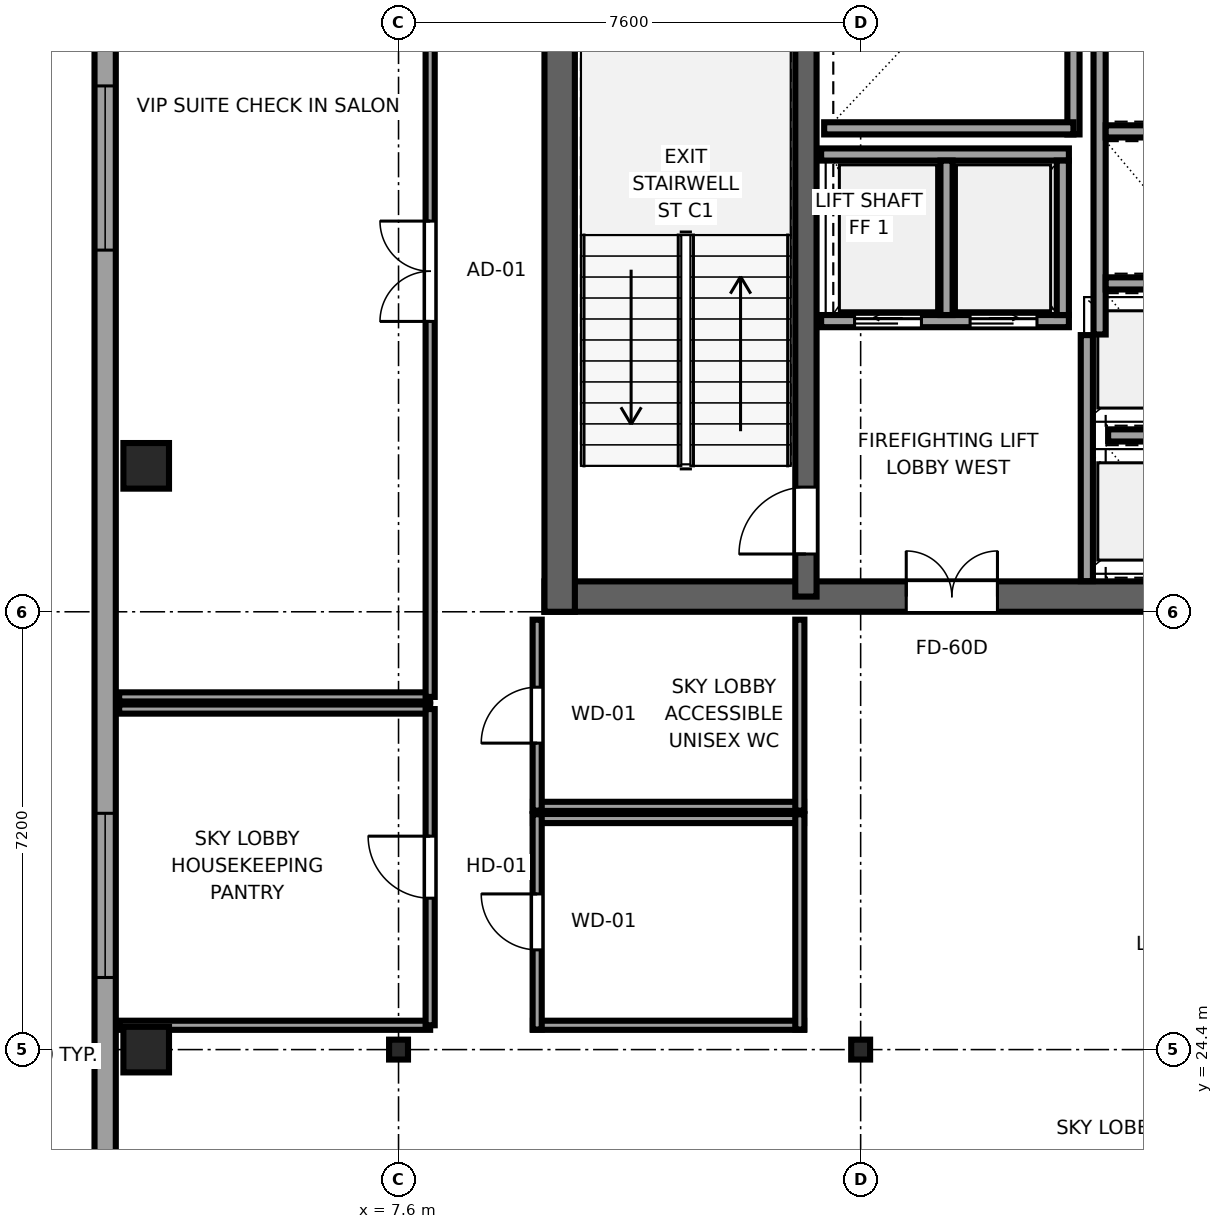
"""IFC4 building model, lengths in metres.
Left out: names, types, materials, properties, quantities, classifications, styles, units other than length and angle.
Written with IfcOpenShell. Run it as: python <this file> out.ifc"""

import sys

from ifc_helpers import new_model, si_unit, direction, frame, frame_2d, origin, origin_2d, place, context, subcontext, project, spatial, rectangle, i_section, extrude, source, transform, mapped, element, fill, save


model = new_model("IFC4")
c1 = context("Model", 3, precision=1e-05, world=origin(), true_north=direction((0.0, 1.0)))
c2 = subcontext(c1, "Body", "Model", "MODEL_VIEW")
j1 = project(units=[si_unit("LENGTHUNIT", "METRE"), si_unit("PLANEANGLEUNIT", "RADIAN")], contexts=[c1])
p1 = place(None, origin())
s1 = spatial("IfcSite", under=j1, at=p1, CompositionType="ELEMENT")
p2 = place(p1, origin())
s2 = spatial("IfcBuilding", under=s1, at=p2, CompositionType="ELEMENT")
p3 = place(p2, frame((0.0, 0.0, 205.3)))
s3 = spatial("IfcBuildingStorey", under=s2, at=p3, CompositionType="ELEMENT", Elevation=205.3)
p4 = place(p3, frame((10.0, 31.85, 0.0), z_axis=(0.0, 0.0, 1.0), x_axis=(1.0, 0.0, 0.0)))
e1 = element("IfcWall", 1, at=p4, inside=s3, PredefinedType="SHEAR", context=c2, shape_type="SweptSolid", body=[
    extrude(rectangle(XDim=26.0, YDim=0.5, at=frame_2d((13.0, 0.0))), origin(), (0.0, 0.0, 1.0), 4.4),
])
p5 = place(p4, frame((7.45, 0.0, 0.0), z_axis=(0.0, 0.0, 1.0), x_axis=(-1.0, 0.0, 0.0)))
e2 = element("IfcOpeningElement", 2, at=p5, cuts=e1, PredefinedType="OPENING", context=c2, shape_type="SweptSolid", body=[
    extrude(rectangle(XDim=1.5, YDim=2.04, at=frame_2d((0.75, 1.02))), frame((0.0, 0.26, 0.0), z_axis=(0.0, -1.0, 0.0), x_axis=(1.0, 0.0, 0.0)), (0.0, 0.0, 1.0), 0.52),
])
p6 = place(p4, frame((13.75, 0.0, 0.0), z_axis=(0.0, 0.0, 1.0), x_axis=(-1.0, 0.0, 0.0)))
e3 = element("IfcOpeningElement", 3, at=p6, cuts=e1, PredefinedType="OPENING", context=c2, shape_type="SweptSolid", body=[
    extrude(rectangle(XDim=1.5, YDim=2.04, at=frame_2d((0.75, 1.02))), frame((0.0, 0.26, 0.0), z_axis=(0.0, -1.0, 0.0), x_axis=(1.0, 0.0, 0.0)), (0.0, 0.0, 1.0), 0.52),
])
p7 = place(p4, frame((20.05, 0.0, 0.0), z_axis=(0.0, 0.0, 1.0), x_axis=(-1.0, 0.0, 0.0)))
e4 = element("IfcOpeningElement", 4, at=p7, cuts=e1, PredefinedType="OPENING", context=c2, shape_type="SweptSolid", body=[
    extrude(rectangle(XDim=1.5, YDim=2.04, at=frame_2d((0.75, 1.02))), frame((0.0, 0.26, 0.0), z_axis=(0.0, -1.0, 0.0), x_axis=(1.0, 0.0, 0.0)), (0.0, 0.0, 1.0), 0.52),
])
p8 = place(p3, frame((10.25, 31.6, 0.0), z_axis=(0.0, 0.0, 1.0), x_axis=(0.0, 1.0, 0.0)))
e5 = element("IfcWall", 5, at=p8, inside=s3, PredefinedType="SHEAR", context=c2, shape_type="SweptSolid", body=[
    extrude(rectangle(XDim=13.6, YDim=0.5, at=frame_2d((6.8, 0.0))), origin(), (0.0, 0.0, 1.0), 4.4),
])
p9 = place(p3, frame((14.3, 31.85, 0.0), z_axis=(0.0, 0.0, 1.0), x_axis=(0.0, 1.0, 0.0)))
e6 = element("IfcWall", 6, at=p9, inside=s3, PredefinedType="SHEAR", context=c2, shape_type="SweptSolid", body=[
    extrude(rectangle(XDim=13.1, YDim=0.35, at=frame_2d((6.55, 0.0))), origin(), (0.0, 0.0, 1.0), 4.4),
])
p10 = place(p9, frame((0.7, 0.0, 0.0)))
e7 = element("IfcOpeningElement", 7, at=p10, cuts=e6, PredefinedType="OPENING", context=c2, shape_type="SweptSolid", body=[
    extrude(rectangle(XDim=1.1, YDim=2.12, at=frame_2d((0.55, 1.06))), frame((0.0, 0.185, 0.0), z_axis=(0.0, -1.0, 0.0), x_axis=(1.0, 0.0, 0.0)), (0.0, 0.0, 1.0), 0.37),
])
m1 = source(origin(), c2, "Body", "SweptSolid", [
    extrude(rectangle(XDim=0.75, YDim=0.75, at=origin_2d()), origin(), (0.0, 0.0, 1.0), 4.4),
])
p11 = place(p3, frame((3.45, 24.4, 0.0), z_axis=(0.0, 0.0, 1.0), x_axis=(1.0, 0.0, 0.0)))
e8 = element("IfcColumn", 8, at=p11, inside=s3, PredefinedType="COLUMN", context=c2, shape_type="MappedRepresentation", body=[
    mapped(m1, transform((0.0, 0.0, 0.0), x_axis=(1.0, 0.0, 0.0), y_axis=(0.0, 1.0, 0.0), z_axis=(0.0, 0.0, 1.0), scale=1.0)),
])
m2 = source(origin(), c2, "Body", "SweptSolid", [
    extrude(i_section(OverallWidth=0.311, OverallDepth=0.327, WebThickness=0.016, FlangeThickness=0.025, FilletRadius=0.017, at=origin_2d()), origin(), (0.0, 0.0, 1.0), 4.4),
])
for number, where, z_axis, x_axis in (
    (9, (7.6, 24.4, 0.0), (0.0, 0.0, 1.0), (1.0, 0.0, 0.0)),
    (10, (15.2, 24.4, 0.0), (0.0, 0.0, 1.0), (1.0, 0.0, 0.0)),
):
    element("IfcColumn", number, at=place(p3, frame(where, z_axis=z_axis, x_axis=x_axis)), inside=s3, PredefinedType="COLUMN", context=c2, shape_type="MappedRepresentation", body=[
        mapped(m2, transform((0.0, 0.0, 0.0), x_axis=(1.0, 0.0, 0.0), y_axis=(0.0, 1.0, 0.0), z_axis=(0.0, 0.0, 1.0), scale=1.0)),
    ])
p12 = place(p3, frame((3.45, 34.0, 0.0), z_axis=(0.0, 0.0, 1.0), x_axis=(1.0, 0.0, 0.0)))
e11 = element("IfcColumn", 11, at=p12, inside=s3, PredefinedType="COLUMN", context=c2, shape_type="MappedRepresentation", body=[
    mapped(m1, transform((0.0, 0.0, 0.0), x_axis=(1.0, 0.0, 0.0), y_axis=(0.0, 1.0, 0.0), z_axis=(0.0, 0.0, 1.0), scale=1.0)),
])
p13 = place(p3, frame((2.775, 41.583, 0.0), z_axis=(0.0, 0.0, 1.0), x_axis=(0.0, -1.0, 0.0)))
e12 = element("IfcWall", 12, at=p13, inside=s3, PredefinedType="SOLIDWALL", context=c2, shape_type="SweptSolid", body=[
    extrude(rectangle(XDim=34.566, YDim=0.35, at=frame_2d((17.283, 0.0))), origin(), (0.0, 0.0, 1.0), 4.22),
])
p14 = place(p13, frame((1.335, 0.0, 0.68)))
e13 = element("IfcOpeningElement", 13, at=p14, cuts=e12, PredefinedType="OPENING", context=c2, shape_type="SweptSolid", body=[
    extrude(rectangle(XDim=2.7, YDim=1.95, at=frame_2d((1.35, 0.975))), frame((0.0, 0.185, 0.0), z_axis=(0.0, -1.0, 0.0), x_axis=(1.0, 0.0, 0.0)), (0.0, 0.0, 1.0), 0.37),
])
p15 = place(p13, frame((13.297, 0.0, 0.68)))
e14 = element("IfcOpeningElement", 14, at=p15, cuts=e12, PredefinedType="OPENING", context=c2, shape_type="SweptSolid", body=[
    extrude(rectangle(XDim=2.7, YDim=1.95, at=frame_2d((1.35, 0.975))), frame((0.0, 0.185, 0.0), z_axis=(0.0, -1.0, 0.0), x_axis=(1.0, 0.0, 0.0)), (0.0, 0.0, 1.0), 0.37),
])
p16 = place(p13, frame((22.189, 0.0, 0.68)))
e15 = element("IfcOpeningElement", 15, at=p16, cuts=e12, PredefinedType="OPENING", context=c2, shape_type="SweptSolid", body=[
    extrude(rectangle(XDim=2.7, YDim=1.95, at=frame_2d((1.35, 0.975))), frame((0.0, 0.185, 0.0), z_axis=(0.0, -1.0, 0.0), x_axis=(1.0, 0.0, 0.0)), (0.0, 0.0, 1.0), 0.37),
])
p17 = place(p13, frame((26.36, 0.0, 0.68)))
e16 = element("IfcOpeningElement", 16, at=p17, cuts=e12, PredefinedType="OPENING", context=c2, shape_type="SweptSolid", body=[
    extrude(rectangle(XDim=2.7, YDim=1.95, at=frame_2d((1.35, 0.975))), frame((0.0, 0.185, 0.0), z_axis=(0.0, -1.0, 0.0), x_axis=(1.0, 0.0, 0.0)), (0.0, 0.0, 1.0), 0.37),
])
p18 = place(p13, frame((29.98, 0.0, 0.68)))
e17 = element("IfcOpeningElement", 17, at=p18, cuts=e12, PredefinedType="OPENING", context=c2, shape_type="SweptSolid", body=[
    extrude(rectangle(XDim=2.7, YDim=1.95, at=frame_2d((1.35, 0.975))), frame((0.0, 0.185, 0.0), z_axis=(0.0, -1.0, 0.0), x_axis=(1.0, 0.0, 0.0)), (0.0, 0.0, 1.0), 0.37),
])
p19 = place(p3, frame((18.7, 39.45, 0.0), z_axis=(0.0, 0.0, 1.0), x_axis=(0.0, 1.0, 0.0)))
e18 = element("IfcWall", 18, at=p19, inside=s3, PredefinedType="SOLIDWALL", context=c2, shape_type="SweptSolid", body=[
    extrude(rectangle(XDim=4.4, YDim=0.2, at=frame_2d((2.2, 0.0))), origin(), (0.0, 0.0, 1.0), 4.22),
])
p20 = place(p3, frame((14.6, 39.55, 0.0), z_axis=(0.0, 0.0, 1.0), x_axis=(1.0, 0.0, 0.0)))
e19 = element("IfcWall", 19, at=p20, inside=s3, PredefinedType="SOLIDWALL", context=c2, shape_type="SweptSolid", body=[
    extrude(rectangle(XDim=4.1, YDim=0.2, at=frame_2d((2.05, 0.0))), origin(), (0.0, 0.0, 1.0), 4.22),
])
p21 = place(p3, frame((18.92, 32.104, 0.0), z_axis=(0.0, 0.0, 1.0), x_axis=(0.0, 1.0, 0.0)))
e20 = element("IfcWall", 20, at=p21, inside=s3, PredefinedType="SOLIDWALL", context=c2, shape_type="SweptSolid", body=[
    extrude(rectangle(XDim=4.046, YDim=0.2, at=frame_2d((2.023, 0.0))), origin(), (0.0, 0.0, 1.0), 4.22),
])
p22 = place(p3, frame((19.13, 36.16, 0.0), z_axis=(0.0, 0.0, 1.0), x_axis=(0.0, 1.0, 0.0)))
e21 = element("IfcWall", 21, at=p22, inside=s3, PredefinedType="SOLIDWALL", context=c2, shape_type="SweptSolid", body=[
    extrude(rectangle(XDim=8.38, YDim=0.2, at=frame_2d((4.19, 0.0))), origin(), (0.0, 0.0, 1.0), 4.22),
])
p23 = place(p3, frame((19.27, 34.5, 0.0), z_axis=(0.0, 0.0, 1.0), x_axis=(1.0, 0.0, 0.0)))
e22 = element("IfcWall", 22, at=p23, inside=s3, PredefinedType="SOLIDWALL", context=c2, shape_type="SweptSolid", body=[
    extrude(rectangle(XDim=1.8, YDim=0.2, at=frame_2d((0.9, 0.0))), origin(), (0.0, 0.0, 1.0), 4.22),
])
for number, where, z_axis, x_axis in (
    (23, (19.23, 37.0, 0.0), (0.0, 0.0, 1.0), (1.0, 0.0, 0.0)),
    (24, (19.23, 39.5, 0.0), (0.0, 0.0, 1.0), (1.0, 0.0, 0.0)),
):
    element("IfcWall", number, at=place(p3, frame(where, z_axis=z_axis, x_axis=x_axis)), inside=s3, PredefinedType="SOLIDWALL", context=c2, shape_type="SweptSolid", body=[
        extrude(rectangle(XDim=1.84, YDim=0.2, at=frame_2d((0.92, 0.0))), origin(), (0.0, 0.0, 1.0), 4.22),
    ])
p24 = place(p3, frame((14.55, 36.38, 0.0), z_axis=(0.0, 0.0, 1.0), x_axis=(1.0, 0.0, 0.0)))
e25 = element("IfcWall", 25, at=p24, inside=s3, PredefinedType="SOLIDWALL", context=c2, shape_type="SweptSolid", body=[
    extrude(rectangle(XDim=4.075, YDim=0.2, at=frame_2d((2.038, 0.0))), origin(), (0.0, 0.0, 1.0), 4.22),
])
p25 = place(p24, frame((0.55, 0.0, 0.0)))
e26 = element("IfcOpeningElement", 26, at=p25, cuts=e25, PredefinedType="OPENING", context=c2, shape_type="SweptSolid", body=[
    extrude(rectangle(XDim=1.1, YDim=2.12, at=frame_2d((0.55, 1.06))), frame((0.0, 0.11, 0.0), z_axis=(0.0, -1.0, 0.0), x_axis=(1.0, 0.0, 0.0)), (0.0, 0.0, 1.0), 0.22),
])
p26 = place(p24, frame((2.45, 0.0, 0.0)))
e27 = element("IfcOpeningElement", 27, at=p26, cuts=e25, PredefinedType="OPENING", context=c2, shape_type="SweptSolid", body=[
    extrude(rectangle(XDim=1.1, YDim=2.12, at=frame_2d((0.55, 1.06))), frame((0.0, 0.11, 0.0), z_axis=(0.0, -1.0, 0.0), x_axis=(1.0, 0.0, 0.0)), (0.0, 0.0, 1.0), 0.22),
])
p27 = place(p3, frame((14.55, 39.12, 0.0), z_axis=(0.0, 0.0, 1.0), x_axis=(1.0, 0.0, 0.0)))
e28 = element("IfcWall", 28, at=p27, inside=s3, PredefinedType="SOLIDWALL", context=c2, shape_type="SweptSolid", body=[
    extrude(rectangle(XDim=4.075, YDim=0.2, at=frame_2d((2.038, 0.0))), origin(), (0.0, 0.0, 1.0), 4.22),
])
for number, where, z_axis, x_axis in (
    (29, (18.525, 36.48, 0.0), (0.0, 0.0, 1.0), (0.0, 1.0, 0.0)),
    (30, (16.613, 36.48, 0.0), (0.0, 0.0, 1.0), (0.0, 1.0, 0.0)),
):
    element("IfcWall", number, at=place(p3, frame(where, z_axis=z_axis, x_axis=x_axis)), inside=s3, PredefinedType="SOLIDWALL", context=c2, shape_type="SweptSolid", body=[
        extrude(rectangle(XDim=2.54, YDim=0.2, at=frame_2d((1.27, 0.0))), origin(), (0.0, 0.0, 1.0), 4.22),
    ])
p28 = place(p3, frame((3.005, 30.2, 0.0), z_axis=(0.0, 0.0, 1.0), x_axis=(1.0, 0.0, 0.0)))
e31 = element("IfcWall", 31, at=p28, inside=s3, PredefinedType="PARTITIONING", context=c2, shape_type="SweptSolid", body=[
    extrude(rectangle(XDim=5.115, YDim=0.15, at=frame_2d((2.558, 0.0))), origin(), (0.0, 0.0, 1.0), 4.22),
])
p29 = place(p3, frame((8.12, 30.2, 0.0), z_axis=(0.0, 0.0, 1.0), x_axis=(0.0, 1.0, 0.0)))
e32 = element("IfcWall", 32, at=p29, inside=s3, PredefinedType="PARTITIONING", context=c2, shape_type="SweptSolid", body=[
    extrude(rectangle(XDim=14.0, YDim=0.15, at=frame_2d((7.0, 0.0))), origin(), (0.0, 0.0, 1.0), 4.22),
])
p30 = place(p29, frame((6.175, 0.0, 0.0)))
e33 = element("IfcOpeningElement", 33, at=p30, cuts=e32, PredefinedType="OPENING", context=c2, shape_type="SweptSolid", body=[
    extrude(rectangle(XDim=1.65, YDim=2.15, at=frame_2d((0.825, 1.075))), frame((0.0, 0.085, 0.0), z_axis=(0.0, -1.0, 0.0), x_axis=(1.0, 0.0, 0.0)), (0.0, 0.0, 1.0), 0.17),
])
for number, where, z_axis, x_axis in (
    (34, (9.81, 24.8, 0.0), (0.0, 0.0, 1.0), (1.0, 0.0, 0.0)),
    (35, (9.81, 28.2, 0.0), (0.0, 0.0, 1.0), (1.0, 0.0, 0.0)),
):
    element("IfcWall", number, at=place(p3, frame(where, z_axis=z_axis, x_axis=x_axis)), inside=s3, PredefinedType="PARTITIONING", context=c2, shape_type="SweptSolid", body=[
        extrude(rectangle(XDim=4.46, YDim=0.15, at=frame_2d((2.23, 0.0))), origin(), (0.0, 0.0, 1.0), 4.22),
    ])
p31 = place(p3, frame((9.88, 24.73, 0.0), z_axis=(0.0, 0.0, 1.0), x_axis=(0.0, 1.0, 0.0)))
e36 = element("IfcWall", 36, at=p31, inside=s3, PredefinedType="PARTITIONING", context=c2, shape_type="SweptSolid", body=[
    extrude(rectangle(XDim=3.54, YDim=0.15, at=frame_2d((1.77, 0.0))), origin(), (0.0, 0.0, 1.0), 4.22),
])
p32 = place(p31, frame((1.31, 0.0, 0.0)))
e37 = element("IfcOpeningElement", 37, at=p32, cuts=e36, PredefinedType="OPENING", context=c2, shape_type="SweptSolid", body=[
    extrude(rectangle(XDim=0.92, YDim=2.01, at=frame_2d((0.46, 1.005))), frame((0.0, 0.085, 0.0), z_axis=(0.0, -1.0, 0.0), x_axis=(1.0, 0.0, 0.0)), (0.0, 0.0, 1.0), 0.17),
])
p33 = place(p3, frame((14.2, 24.73, 0.0), z_axis=(0.0, 0.0, 1.0), x_axis=(0.0, 1.0, 0.0)))
e38 = element("IfcWall", 38, at=p33, inside=s3, PredefinedType="PARTITIONING", context=c2, shape_type="SweptSolid", body=[
    extrude(rectangle(XDim=3.54, YDim=0.15, at=frame_2d((1.77, 0.0))), origin(), (0.0, 0.0, 1.0), 4.22),
])
p34 = place(p3, frame((9.81, 28.4, 0.0), z_axis=(0.0, 0.0, 1.0), x_axis=(1.0, 0.0, 0.0)))
e39 = element("IfcWall", 39, at=p34, inside=s3, PredefinedType="PARTITIONING", context=c2, shape_type="SweptSolid", body=[
    extrude(rectangle(XDim=4.46, YDim=0.15, at=frame_2d((2.23, 0.0))), origin(), (0.0, 0.0, 1.0), 4.22),
])
p35 = place(p3, frame((9.88, 28.33, 0.0), z_axis=(0.0, 0.0, 1.0), x_axis=(0.0, 1.0, 0.0)))
e40 = element("IfcWall", 40, at=p35, inside=s3, PredefinedType="PARTITIONING", context=c2, shape_type="SweptSolid", body=[
    extrude(rectangle(XDim=3.14, YDim=0.15, at=frame_2d((1.57, 0.0))), origin(), (0.0, 0.0, 1.0), 4.22),
])
p36 = place(p35, frame((1.11, 0.0, 0.0)))
e41 = element("IfcOpeningElement", 41, at=p36, cuts=e40, PredefinedType="OPENING", context=c2, shape_type="SweptSolid", body=[
    extrude(rectangle(XDim=0.92, YDim=2.01, at=frame_2d((0.46, 1.005))), frame((0.0, 0.085, 0.0), z_axis=(0.0, -1.0, 0.0), x_axis=(1.0, 0.0, 0.0)), (0.0, 0.0, 1.0), 0.17),
])
p37 = place(p3, frame((14.2, 28.33, 0.0), z_axis=(0.0, 0.0, 1.0), x_axis=(0.0, 1.0, 0.0)))
e42 = element("IfcWall", 42, at=p37, inside=s3, PredefinedType="PARTITIONING", context=c2, shape_type="SweptSolid", body=[
    extrude(rectangle(XDim=3.14, YDim=0.15, at=frame_2d((1.57, 0.0))), origin(), (0.0, 0.0, 1.0), 4.22),
])
for number, where, z_axis, x_axis in (
    (43, (3.005, 24.8, 0.0), (0.0, 0.0, 1.0), (1.0, 0.0, 0.0)),
    (44, (3.005, 30.0, 0.0), (0.0, 0.0, 1.0), (1.0, 0.0, 0.0)),
):
    element("IfcWall", number, at=place(p3, frame(where, z_axis=z_axis, x_axis=x_axis)), inside=s3, PredefinedType="PARTITIONING", context=c2, shape_type="SweptSolid", body=[
        extrude(rectangle(XDim=5.115, YDim=0.15, at=frame_2d((2.558, 0.0))), origin(), (0.0, 0.0, 1.0), 4.22),
    ])
p38 = place(p3, frame((8.12, 24.8, 0.0), z_axis=(0.0, 0.0, 1.0), x_axis=(0.0, 1.0, 0.0)))
e45 = element("IfcWall", 45, at=p38, inside=s3, PredefinedType="PARTITIONING", context=c2, shape_type="SweptSolid", body=[
    extrude(rectangle(XDim=5.2, YDim=0.15, at=frame_2d((2.6, 0.0))), origin(), (0.0, 0.0, 1.0), 4.22),
])
p39 = place(p38, frame((2.09, 0.0, 0.0)))
e46 = element("IfcOpeningElement", 46, at=p39, cuts=e45, PredefinedType="OPENING", context=c2, shape_type="SweptSolid", body=[
    extrude(rectangle(XDim=1.02, YDim=2.03, at=frame_2d((0.51, 1.015))), frame((0.0, 0.085, 0.0), z_axis=(0.0, -1.0, 0.0), x_axis=(1.0, 0.0, 0.0)), (0.0, 0.0, 1.0), 0.17),
])
m3 = source(origin(), c2, "Body", "SweptSolid", [
    extrude(rectangle(XDim=2.7, YDim=1.95, at=frame_2d((1.35, 0.975))), frame((0.0, 0.09, 0.0), z_axis=(0.0, -1.0, 0.0), x_axis=(1.0, 0.0, 0.0)), (0.0, 0.0, 1.0), 0.06),
])
p40 = place(p14, origin())
e47 = element("IfcWindow", 47, at=p40, inside=s3, PartitioningType="TRIPLE_PANEL_HORIZONTAL", PredefinedType="WINDOW", context=c2, shape_type="MappedRepresentation", body=[
    mapped(m3, transform((0.0, 0.0, 0.0), x_axis=(1.0, 0.0, 0.0), y_axis=(0.0, 1.0, 0.0), z_axis=(0.0, 0.0, 1.0), scale=1.0)),
])
fill(e13, e47)
p41 = place(p15, origin())
e48 = element("IfcWindow", 48, at=p41, inside=s3, PartitioningType="TRIPLE_PANEL_HORIZONTAL", PredefinedType="WINDOW", context=c2, shape_type="MappedRepresentation", body=[
    mapped(m3, transform((0.0, 0.0, 0.0), x_axis=(1.0, 0.0, 0.0), y_axis=(0.0, 1.0, 0.0), z_axis=(0.0, 0.0, 1.0), scale=1.0)),
])
fill(e14, e48)
m4 = source(origin(), c2, "Body", "SweptSolid", [
    extrude(rectangle(XDim=1.1, YDim=2.12, at=frame_2d((0.55, 1.06))), frame((0.0, 0.025, 0.0), z_axis=(0.0, -1.0, 0.0), x_axis=(1.0, 0.0, 0.0)), (0.0, 0.0, 1.0), 0.05),
])
p42 = place(p10, origin())
e49 = element("IfcDoor", 49, at=p42, inside=s3, OperationType="SINGLE_SWING_LEFT", PredefinedType="DOOR", context=c2, shape_type="MappedRepresentation", body=[
    mapped(m4, transform((0.0, 0.0, 0.0), x_axis=(1.0, 0.0, 0.0), y_axis=(0.0, 1.0, 0.0), z_axis=(0.0, 0.0, 1.0), scale=1.0)),
])
fill(e7, e49)
m5 = source(origin(), c2, "Body", "SweptSolid", [
    extrude(rectangle(XDim=1.5, YDim=2.04, at=frame_2d((0.75, 1.02))), frame((0.0, 0.025, 0.0), z_axis=(0.0, -1.0, 0.0), x_axis=(1.0, 0.0, 0.0)), (0.0, 0.0, 1.0), 0.05),
])
p43 = place(p5, origin())
e50 = element("IfcDoor", 50, at=p43, inside=s3, OperationType="DOUBLE_DOOR_SINGLE_SWING", PredefinedType="DOOR", context=c2, shape_type="MappedRepresentation", body=[
    mapped(m5, transform((0.0, 0.0, 0.0), x_axis=(1.0, 0.0, 0.0), y_axis=(0.0, 1.0, 0.0), z_axis=(0.0, 0.0, 1.0), scale=1.0)),
])
fill(e2, e50)
m6 = source(origin(), c2, "Body", "SweptSolid", [
    extrude(rectangle(XDim=1.1, YDim=2.12, at=frame_2d((0.55, 1.06))), frame((0.0, 0.025, 0.0), z_axis=(0.0, -1.0, 0.0), x_axis=(1.0, 0.0, 0.0)), (0.0, 0.0, 1.0), 0.05),
])
p44 = place(p25, origin())
e51 = element("IfcDoor", 51, at=p44, inside=s3, OperationType="SLIDING_TO_LEFT", PredefinedType="DOOR", context=c2, shape_type="MappedRepresentation", body=[
    mapped(m6, transform((0.0, 0.0, 0.0), x_axis=(1.0, 0.0, 0.0), y_axis=(0.0, 1.0, 0.0), z_axis=(0.0, 0.0, 1.0), scale=1.0)),
])
fill(e26, e51)
p45 = place(p26, origin())
e52 = element("IfcDoor", 52, at=p45, inside=s3, OperationType="SLIDING_TO_RIGHT", PredefinedType="DOOR", context=c2, shape_type="MappedRepresentation", body=[
    mapped(m6, transform((0.0, 0.0, 0.0), x_axis=(1.0, 0.0, 0.0), y_axis=(0.0, 1.0, 0.0), z_axis=(0.0, 0.0, 1.0), scale=1.0)),
])
fill(e27, e52)
m7 = source(origin(), c2, "Body", "SweptSolid", [
    extrude(rectangle(XDim=1.65, YDim=2.15, at=frame_2d((0.825, 1.075))), frame((0.0, 0.025, 0.0), z_axis=(0.0, -1.0, 0.0), x_axis=(1.0, 0.0, 0.0)), (0.0, 0.0, 1.0), 0.05),
])
p46 = place(p30, origin())
e53 = element("IfcDoor", 53, at=p46, inside=s3, OperationType="DOUBLE_DOOR_SINGLE_SWING", PredefinedType="DOOR", context=c2, shape_type="MappedRepresentation", body=[
    mapped(m7, transform((0.0, 0.0, 0.0), x_axis=(1.0, 0.0, 0.0), y_axis=(0.0, 1.0, 0.0), z_axis=(0.0, 0.0, 1.0), scale=1.0)),
])
fill(e33, e53)
m8 = source(origin(), c2, "Body", "SweptSolid", [
    extrude(rectangle(XDim=0.92, YDim=2.01, at=frame_2d((0.46, 1.005))), frame((0.0, 0.025, 0.0), z_axis=(0.0, -1.0, 0.0), x_axis=(1.0, 0.0, 0.0)), (0.0, 0.0, 1.0), 0.05),
])
p47 = place(p32, origin())
e54 = element("IfcDoor", 54, at=p47, inside=s3, OperationType="SINGLE_SWING_RIGHT", PredefinedType="DOOR", context=c2, shape_type="MappedRepresentation", body=[
    mapped(m8, transform((0.0, 0.0, 0.0), x_axis=(1.0, 0.0, 0.0), y_axis=(0.0, 1.0, 0.0), z_axis=(0.0, 0.0, 1.0), scale=1.0)),
])
fill(e37, e54)
p48 = place(p36, origin())
e55 = element("IfcDoor", 55, at=p48, inside=s3, OperationType="SINGLE_SWING_LEFT", PredefinedType="DOOR", context=c2, shape_type="MappedRepresentation", body=[
    mapped(m8, transform((0.0, 0.0, 0.0), x_axis=(1.0, 0.0, 0.0), y_axis=(0.0, 1.0, 0.0), z_axis=(0.0, 0.0, 1.0), scale=1.0)),
])
fill(e41, e55)
m9 = source(origin(), c2, "Body", "SweptSolid", [
    extrude(rectangle(XDim=1.02, YDim=2.03, at=frame_2d((0.51, 1.015))), frame((0.0, 0.025, 0.0), z_axis=(0.0, -1.0, 0.0), x_axis=(1.0, 0.0, 0.0)), (0.0, 0.0, 1.0), 0.05),
])
p49 = place(p39, origin())
e56 = element("IfcDoor", 56, at=p49, inside=s3, OperationType="SINGLE_SWING_RIGHT", PredefinedType="DOOR", context=c2, shape_type="MappedRepresentation", body=[
    mapped(m9, transform((0.0, 0.0, 0.0), x_axis=(1.0, 0.0, 0.0), y_axis=(0.0, 1.0, 0.0), z_axis=(0.0, 0.0, 1.0), scale=1.0)),
])
fill(e46, e56)
save(model, sys.argv[1])
